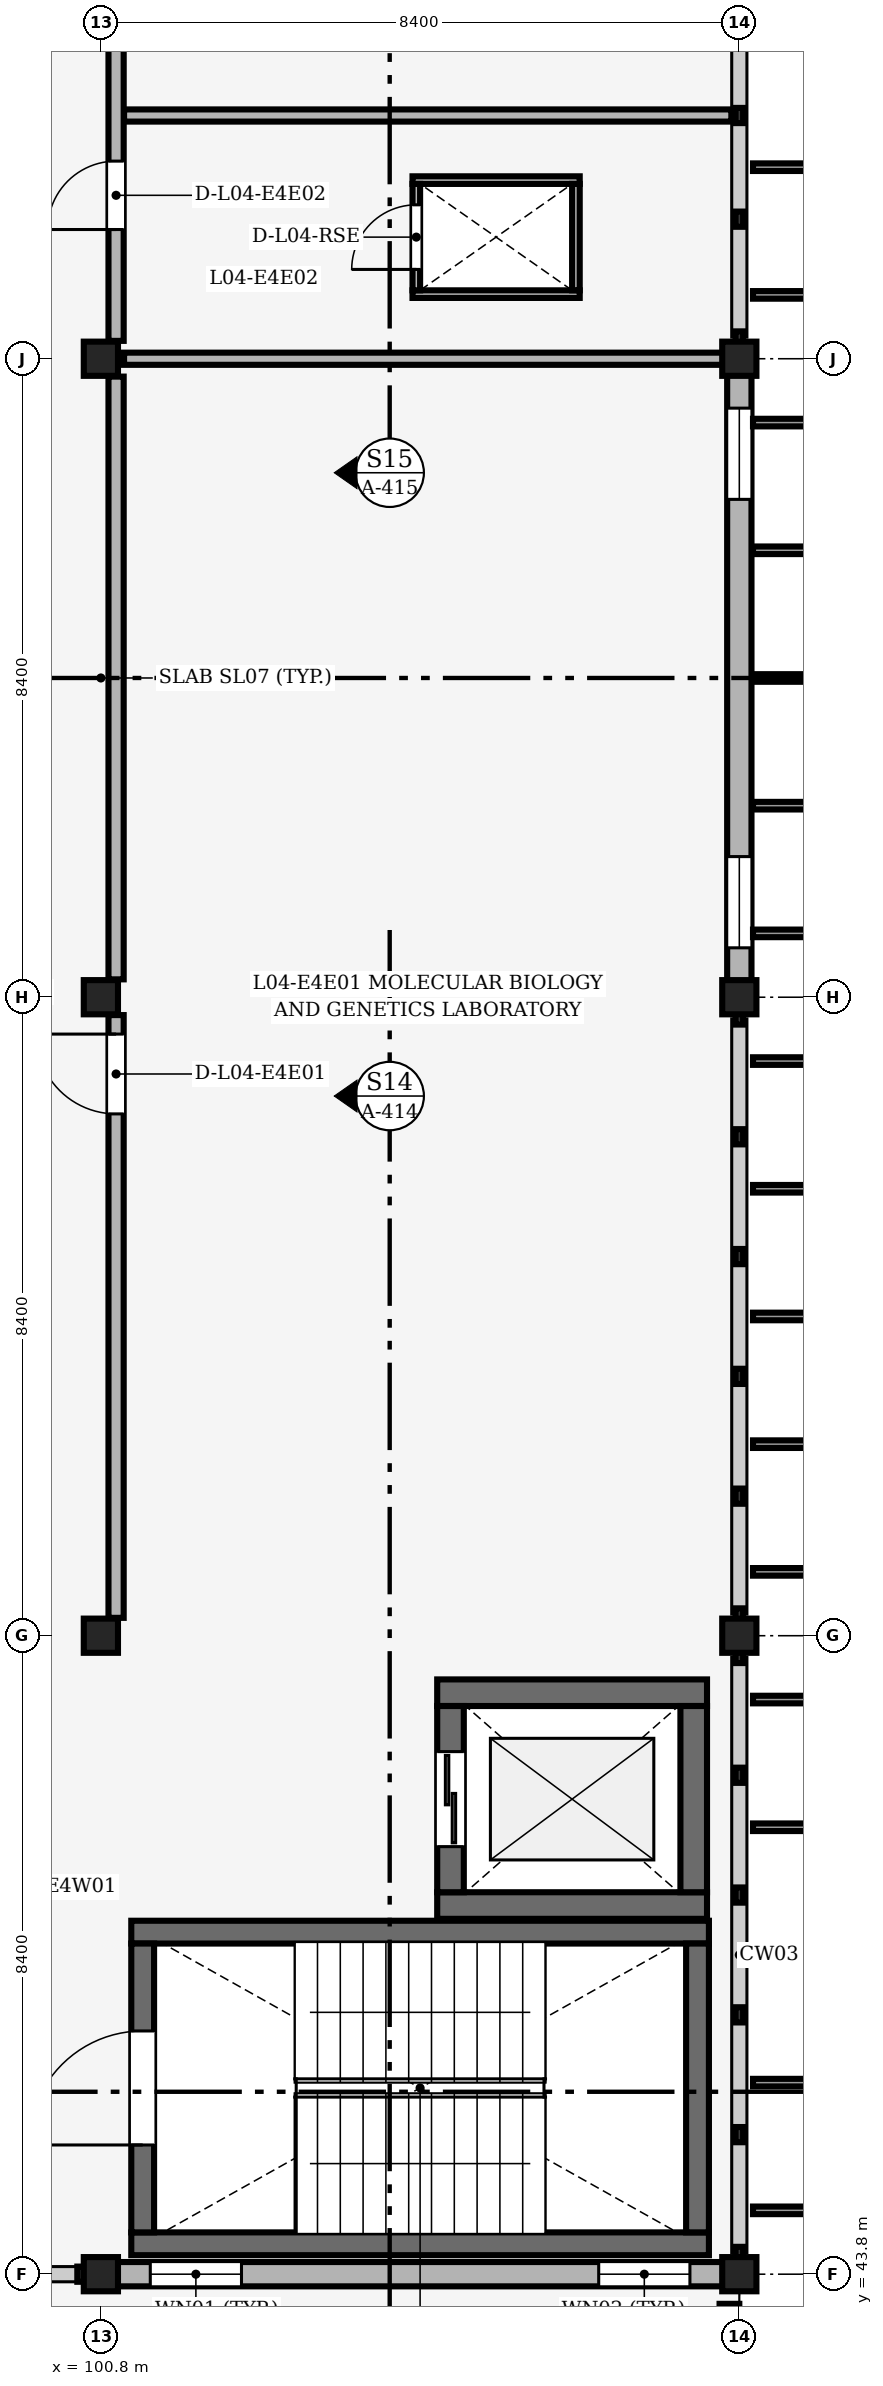
"""IFC4 building model, lengths in metres.
Left out: names, types, materials, properties, quantities, classifications, styles, units other than length and angle.
Written with IfcOpenShell. Run it as: python <this file> out.ifc"""

import sys

from ifc_helpers import new_model, si_unit, direction, frame, frame_2d, origin, origin_2d, place, context, subcontext, project, spatial, rectangle, extrude, element, fill, save


model = new_model("IFC4")
c1 = context("Model", 3, precision=1e-05, world=origin(), true_north=direction((0.0, 1.0)))
c2 = subcontext(c1, "Body", "Model", "MODEL_VIEW")
j1 = project(units=[si_unit("LENGTHUNIT", "METRE"), si_unit("PLANEANGLEUNIT", "RADIAN")], contexts=[c1])
p1 = place(None, origin())
s1 = spatial("IfcSite", under=j1, at=p1, CompositionType="ELEMENT")
p2 = place(p1, origin())
s2 = spatial("IfcBuilding", under=s1, at=p2, CompositionType="ELEMENT")
p3 = place(p2, frame((0.0, 0.0, 17.4)))
s3 = spatial("IfcBuildingStorey", under=s2, at=p3, CompositionType="ELEMENT", Elevation=17.4)
for number, where, z_axis, x_axis in (
    (1, (100.8, 43.8, 0.0), (0.0, 0.0, 1.0), (1.0, 0.0, 0.0)),
    (2, (100.8, 52.2, 0.0), (0.0, 0.0, 1.0), (1.0, 0.0, 0.0)),
    (3, (100.8, 60.6, 0.0), (0.0, 0.0, 1.0), (1.0, 0.0, 0.0)),
    (4, (100.8, 69.0, 0.0), (0.0, 0.0, 1.0), (1.0, 0.0, 0.0)),
    (5, (109.2, 43.8, 0.0), (0.0, 0.0, 1.0), (1.0, 0.0, 0.0)),
    (6, (109.2, 52.2, 0.0), (0.0, 0.0, 1.0), (1.0, 0.0, 0.0)),
    (7, (109.2, 60.6, 0.0), (0.0, 0.0, 1.0), (1.0, 0.0, 0.0)),
    (8, (109.2, 69.0, 0.0), (0.0, 0.0, 1.0), (1.0, 0.0, 0.0)),
):
    element("IfcColumn", number, at=place(p3, frame(where, z_axis=z_axis, x_axis=x_axis)), inside=s3, PredefinedType="COLUMN", context=c2, shape_type="SweptSolid", body=[
        extrude(rectangle(XDim=0.45, YDim=0.45, at=origin_2d()), origin(), (0.0, 0.0, 1.0), 4.2),
    ])
p4 = place(p3, frame((101.0, 43.8, 0.0), z_axis=(0.0, 0.0, 1.0), x_axis=(1.0, 0.0, 0.0)))
e9 = element("IfcWall", 9, at=p4, inside=s3, PredefinedType="SOLIDWALL", context=c2, shape_type="SweptSolid", body=[
    extrude(rectangle(XDim=8.0, YDim=0.32, at=frame_2d((4.0, 0.0))), origin(), (0.0, 0.0, 1.0), 3.19),
])
p5 = place(p4, frame((0.45, 0.0, 0.9)))
e10 = element("IfcOpeningElement", 10, at=p5, cuts=e9, PredefinedType="OPENING", context=c2, shape_type="SweptSolid", body=[
    extrude(rectangle(XDim=1.2, YDim=1.5, at=frame_2d((0.6, 0.75))), frame((0.0, 0.17, 0.0), z_axis=(0.0, -1.0, 0.0), x_axis=(1.0, 0.0, 0.0)), (0.0, 0.0, 1.0), 0.34),
])
p6 = place(p4, frame((6.35, 0.0, 0.9)))
e11 = element("IfcOpeningElement", 11, at=p6, cuts=e9, PredefinedType="OPENING", context=c2, shape_type="SweptSolid", body=[
    extrude(rectangle(XDim=1.2, YDim=1.8, at=frame_2d((0.6, 0.9))), frame((0.0, 0.17, 0.0), z_axis=(0.0, -1.0, 0.0), x_axis=(1.0, 0.0, 0.0)), (0.0, 0.0, 1.0), 0.34),
])
p7 = place(p3, frame((109.2, 60.8, 0.0), z_axis=(0.0, 0.0, 1.0), x_axis=(0.0, 1.0, 0.0)))
e12 = element("IfcWall", 12, at=p7, inside=s3, PredefinedType="SOLIDWALL", context=c2, shape_type="SweptSolid", body=[
    extrude(rectangle(XDim=8.0, YDim=0.32, at=frame_2d((4.0, 0.0))), origin(), (0.0, 0.0, 1.0), 3.48),
])
p8 = place(p7, frame((0.45, 0.0, 0.85)))
e13 = element("IfcOpeningElement", 13, at=p8, cuts=e12, PredefinedType="OPENING", context=c2, shape_type="SweptSolid", body=[
    extrude(rectangle(XDim=1.2, YDim=1.8, at=frame_2d((0.6, 0.9))), frame((0.0, 0.17, 0.0), z_axis=(0.0, -1.0, 0.0), x_axis=(1.0, 0.0, 0.0)), (0.0, 0.0, 1.0), 0.34),
])
p9 = place(p7, frame((6.35, 0.0, 0.85)))
e14 = element("IfcOpeningElement", 14, at=p9, cuts=e12, PredefinedType="OPENING", context=c2, shape_type="SweptSolid", body=[
    extrude(rectangle(XDim=1.2, YDim=1.8, at=frame_2d((0.6, 0.9))), frame((0.0, 0.17, 0.0), z_axis=(0.0, -1.0, 0.0), x_axis=(1.0, 0.0, 0.0)), (0.0, 0.0, 1.0), 0.34),
])
p10 = place(p3, frame((109.07, 35.79, 0.0), z_axis=(0.0, 0.0, 1.0), x_axis=(0.0, 1.0, 0.0)))
e15 = element("IfcWall", 15, at=p10, inside=s3, PredefinedType="PARAPET", context=c2, shape_type="SweptSolid", body=[
    extrude(rectangle(XDim=7.62, YDim=0.26, at=frame_2d((3.81, 0.0))), origin(), (0.0, 0.0, 1.0), 0.85),
])
for number, where, z_axis, x_axis in (
    (16, (101.2, 44.2, 0.0), (0.0, 0.0, 1.0), (1.0, 0.0, 0.0)),
    (17, (101.2, 48.3, 0.0), (0.0, 0.0, 1.0), (1.0, 0.0, 0.0)),
):
    element("IfcWall", number, at=place(p3, frame(where, z_axis=z_axis, x_axis=x_axis)), inside=s3, PredefinedType="SHEAR", context=c2, shape_type="SweptSolid", body=[
        extrude(rectangle(XDim=7.6, YDim=0.3, at=frame_2d((3.8, 0.0))), origin(), (0.0, 0.0, 1.0), 4.025),
    ])
p11 = place(p3, frame((101.35, 44.35, 0.0), z_axis=(0.0, 0.0, 1.0), x_axis=(0.0, 1.0, 0.0)))
e18 = element("IfcWall", 18, at=p11, inside=s3, PredefinedType="SHEAR", context=c2, shape_type="SweptSolid", body=[
    extrude(rectangle(XDim=3.8, YDim=0.3, at=frame_2d((1.9, 0.0))), origin(), (0.0, 0.0, 1.0), 4.025),
])
p12 = place(p11, frame((1.15, 0.0, 0.0)))
e19 = element("IfcOpeningElement", 19, at=p12, cuts=e18, PredefinedType="OPENING", context=c2, shape_type="SweptSolid", body=[
    extrude(rectangle(XDim=1.5, YDim=2.2, at=frame_2d((0.75, 1.1))), frame((0.0, 0.16, 0.0), z_axis=(0.0, -1.0, 0.0), x_axis=(1.0, 0.0, 0.0)), (0.0, 0.0, 1.0), 0.32),
])
p13 = place(p3, frame((108.65, 44.35, 0.0), z_axis=(0.0, 0.0, 1.0), x_axis=(0.0, 1.0, 0.0)))
e20 = element("IfcWall", 20, at=p13, inside=s3, PredefinedType="SHEAR", context=c2, shape_type="SweptSolid", body=[
    extrude(rectangle(XDim=3.8, YDim=0.3, at=frame_2d((1.9, 0.0))), origin(), (0.0, 0.0, 1.0), 4.025),
])
for number, where, z_axis, x_axis in (
    (21, (105.225, 48.65, 0.0), (0.0, 0.0, 1.0), (1.0, 0.0, 0.0)),
    (22, (105.225, 51.45, 0.0), (0.0, 0.0, 1.0), (1.0, 0.0, 0.0)),
):
    element("IfcWall", number, at=place(p3, frame(where, z_axis=z_axis, x_axis=x_axis)), inside=s3, PredefinedType="SHEAR", context=c2, shape_type="SweptSolid", body=[
        extrude(rectangle(XDim=3.55, YDim=0.35, at=frame_2d((1.775, 0.0))), origin(), (0.0, 0.0, 1.0), 3.92),
    ])
p14 = place(p3, frame((105.4, 48.825, 0.0), z_axis=(0.0, 0.0, 1.0), x_axis=(0.0, 1.0, 0.0)))
e23 = element("IfcWall", 23, at=p14, inside=s3, PredefinedType="SHEAR", context=c2, shape_type="SweptSolid", body=[
    extrude(rectangle(XDim=2.45, YDim=0.35, at=frame_2d((1.225, 0.0))), origin(), (0.0, 0.0, 1.0), 3.92),
])
p15 = place(p14, frame((0.6, 0.0, 0.0)))
e24 = element("IfcOpeningElement", 24, at=p15, cuts=e23, PredefinedType="OPENING", context=c2, shape_type="SweptSolid", body=[
    extrude(rectangle(XDim=1.25, YDim=2.25, at=frame_2d((0.625, 1.125))), frame((0.0, 0.185, 0.0), z_axis=(0.0, -1.0, 0.0), x_axis=(1.0, 0.0, 0.0)), (0.0, 0.0, 1.0), 0.37),
])
p16 = place(p3, frame((108.6, 48.825, 0.0), z_axis=(0.0, 0.0, 1.0), x_axis=(0.0, 1.0, 0.0)))
e25 = element("IfcWall", 25, at=p16, inside=s3, PredefinedType="SHEAR", context=c2, shape_type="SweptSolid", body=[
    extrude(rectangle(XDim=2.45, YDim=0.35, at=frame_2d((1.225, 0.0))), origin(), (0.0, 0.0, 1.0), 3.92),
])
for number, where, z_axis, x_axis in (
    (26, (104.9, 69.85, 0.0), (0.0, 0.0, 1.0), (1.0, 0.0, 0.0)),
    (27, (104.9, 71.35, 0.0), (0.0, 0.0, 1.0), (1.0, 0.0, 0.0)),
):
    element("IfcWall", number, at=place(p3, frame(where, z_axis=z_axis, x_axis=x_axis)), inside=s3, PredefinedType="PARTITIONING", context=c2, shape_type="SweptSolid", body=[
        extrude(rectangle(XDim=2.2, YDim=0.1, at=frame_2d((1.1, 0.0))), origin(), (0.0, 0.0, 1.0), 3.9),
    ])
p17 = place(p3, frame((104.95, 69.9, 0.0), z_axis=(0.0, 0.0, 1.0), x_axis=(0.0, 1.0, 0.0)))
e28 = element("IfcWall", 28, at=p17, inside=s3, PredefinedType="PARTITIONING", context=c2, shape_type="SweptSolid", body=[
    extrude(rectangle(XDim=1.4, YDim=0.1, at=frame_2d((0.7, 0.0))), origin(), (0.0, 0.0, 1.0), 3.9),
])
p18 = place(p17, frame((0.275, 0.0, 0.0)))
e29 = element("IfcOpeningElement", 29, at=p18, cuts=e28, PredefinedType="OPENING", context=c2, shape_type="SweptSolid", body=[
    extrude(rectangle(XDim=0.85, YDim=2.05, at=frame_2d((0.425, 1.025))), frame((0.0, 0.06, 0.0), z_axis=(0.0, -1.0, 0.0), x_axis=(1.0, 0.0, 0.0)), (0.0, 0.0, 1.0), 0.12),
])
p19 = place(p3, frame((107.05, 69.9, 0.0), z_axis=(0.0, 0.0, 1.0), x_axis=(0.0, 1.0, 0.0)))
e30 = element("IfcWall", 30, at=p19, inside=s3, PredefinedType="PARTITIONING", context=c2, shape_type="SweptSolid", body=[
    extrude(rectangle(XDim=1.4, YDim=0.1, at=frame_2d((0.7, 0.0))), origin(), (0.0, 0.0, 1.0), 3.9),
])
p20 = place(p3, frame((101.105, 69.0, 0.0), z_axis=(0.0, 0.0, 1.0), x_axis=(1.0, 0.0, 0.0)))
e31 = element("IfcWall", 31, at=p20, inside=s3, PredefinedType="PARTITIONING", context=c2, shape_type="SweptSolid", body=[
    extrude(rectangle(XDim=7.93, YDim=0.16, at=frame_2d((3.965, 0.0))), origin(), (0.0, 0.0, 1.0), 3.43),
])
p21 = place(p3, frame((101.105, 72.2, 0.0), z_axis=(0.0, 0.0, 1.0), x_axis=(1.0, 0.0, 0.0)))
e32 = element("IfcWall", 32, at=p21, inside=s3, PredefinedType="PARTITIONING", context=c2, shape_type="SweptSolid", body=[
    extrude(rectangle(XDim=7.99, YDim=0.16, at=frame_2d((3.995, 0.0))), origin(), (0.0, 0.0, 1.0), 3.9),
])
p22 = place(p3, frame((101.0, 52.435, 0.0), z_axis=(0.0, 0.0, 1.0), x_axis=(0.0, 1.0, 0.0)))
e33 = element("IfcWall", 33, at=p22, inside=s3, PredefinedType="PARTITIONING", context=c2, shape_type="SweptSolid", body=[
    extrude(rectangle(XDim=7.93, YDim=0.2, at=frame_2d((3.965, 0.0))), origin(), (0.0, 0.0, 1.0), 3.13),
])
p23 = place(p22, frame((6.63, 0.0, 0.0)))
e34 = element("IfcOpeningElement", 34, at=p23, cuts=e33, PredefinedType="OPENING", context=c2, shape_type="SweptSolid", body=[
    extrude(rectangle(XDim=1.05, YDim=2.2, at=frame_2d((0.525, 1.1))), frame((0.0, 0.11, 0.0), z_axis=(0.0, -1.0, 0.0), x_axis=(1.0, 0.0, 0.0)), (0.0, 0.0, 1.0), 0.22),
])
p24 = place(p3, frame((101.0, 60.835, 0.0), z_axis=(0.0, 0.0, 1.0), x_axis=(0.0, 1.0, 0.0)))
e35 = element("IfcWall", 35, at=p24, inside=s3, PredefinedType="PARTITIONING", context=c2, shape_type="SweptSolid", body=[
    extrude(rectangle(XDim=7.93, YDim=0.2, at=frame_2d((3.965, 0.0))), origin(), (0.0, 0.0, 1.0), 3.43),
])
p25 = place(p3, frame((101.0, 69.235, 0.0), z_axis=(0.0, 0.0, 1.0), x_axis=(0.0, 1.0, 0.0)))
e36 = element("IfcWall", 36, at=p25, inside=s3, PredefinedType="PARTITIONING", context=c2, shape_type="SweptSolid", body=[
    extrude(rectangle(XDim=7.93, YDim=0.2, at=frame_2d((3.965, 0.0))), origin(), (0.0, 0.0, 1.0), 3.48),
])
p26 = place(p25, frame((1.465, 0.0, 0.0)))
e37 = element("IfcOpeningElement", 37, at=p26, cuts=e36, PredefinedType="OPENING", context=c2, shape_type="SweptSolid", body=[
    extrude(rectangle(XDim=0.9, YDim=2.1, at=frame_2d((0.45, 1.05))), frame((0.0, 0.11, 0.0), z_axis=(0.0, -1.0, 0.0), x_axis=(1.0, 0.0, 0.0)), (0.0, 0.0, 1.0), 0.22),
])
p27 = place(p25, frame((5.04, 0.0, 0.0)))
e38 = element("IfcOpeningElement", 38, at=p27, cuts=e36, PredefinedType="OPENING", context=c2, shape_type="SweptSolid", body=[
    extrude(rectangle(XDim=1.05, YDim=2.2, at=frame_2d((0.525, 1.1))), frame((0.0, 0.11, 0.0), z_axis=(0.0, -1.0, 0.0), x_axis=(1.0, 0.0, 0.0)), (0.0, 0.0, 1.0), 0.22),
])
p28 = place(p5, origin())
e39 = element("IfcWindow", 39, at=p28, inside=s3, PartitioningType="SINGLE_PANEL", PredefinedType="WINDOW", context=c2, shape_type="SweptSolid", body=[
    extrude(rectangle(XDim=1.2, YDim=1.5, at=frame_2d((0.6, 0.75))), frame((0.0, 0.03, 0.0), z_axis=(0.0, -1.0, 0.0), x_axis=(1.0, 0.0, 0.0)), (0.0, 0.0, 1.0), 0.06),
])
fill(e10, e39)
p29 = place(p6, origin())
e40 = element("IfcWindow", 40, at=p29, inside=s3, PartitioningType="SINGLE_PANEL", PredefinedType="WINDOW", context=c2, shape_type="SweptSolid", body=[
    extrude(rectangle(XDim=1.2, YDim=1.8, at=frame_2d((0.6, 0.9))), frame((0.0, 0.03, 0.0), z_axis=(0.0, -1.0, 0.0), x_axis=(1.0, 0.0, 0.0)), (0.0, 0.0, 1.0), 0.06),
])
fill(e11, e40)
p30 = place(p8, origin())
e41 = element("IfcWindow", 41, at=p30, inside=s3, PartitioningType="SINGLE_PANEL", PredefinedType="WINDOW", context=c2, shape_type="SweptSolid", body=[
    extrude(rectangle(XDim=1.2, YDim=1.8, at=frame_2d((0.6, 0.9))), frame((0.0, 0.03, 0.0), z_axis=(0.0, -1.0, 0.0), x_axis=(1.0, 0.0, 0.0)), (0.0, 0.0, 1.0), 0.06),
])
fill(e13, e41)
p31 = place(p9, origin())
e42 = element("IfcWindow", 42, at=p31, inside=s3, PartitioningType="SINGLE_PANEL", PredefinedType="WINDOW", context=c2, shape_type="SweptSolid", body=[
    extrude(rectangle(XDim=1.2, YDim=1.8, at=frame_2d((0.6, 0.9))), frame((0.0, 0.03, 0.0), z_axis=(0.0, -1.0, 0.0), x_axis=(1.0, 0.0, 0.0)), (0.0, 0.0, 1.0), 0.06),
])
fill(e14, e42)
p32 = place(p12, origin())
e43 = element("IfcDoor", 43, at=p32, inside=s3, OperationType="DOUBLE_DOOR_SINGLE_SWING", PredefinedType="DOOR", context=c2, shape_type="SweptSolid", body=[
    extrude(rectangle(XDim=1.5, YDim=2.2, at=frame_2d((0.75, 1.1))), frame((0.0, 0.025, 0.0), z_axis=(0.0, -1.0, 0.0), x_axis=(1.0, 0.0, 0.0)), (0.0, 0.0, 1.0), 0.05),
])
fill(e19, e43)
p33 = place(p15, origin())
e44 = element("IfcDoor", 44, at=p33, inside=s3, OperationType="DOUBLE_DOOR_SLIDING", PredefinedType="DOOR", context=c2, shape_type="SweptSolid", body=[
    extrude(rectangle(XDim=1.25, YDim=2.25, at=frame_2d((0.625, 1.125))), frame((0.0, 0.025, 0.0), z_axis=(0.0, -1.0, 0.0), x_axis=(1.0, 0.0, 0.0)), (0.0, 0.0, 1.0), 0.05),
])
fill(e24, e44)
p34 = place(p18, origin())
e45 = element("IfcDoor", 45, at=p34, inside=s3, OperationType="SINGLE_SWING_LEFT", PredefinedType="DOOR", context=c2, shape_type="SweptSolid", body=[
    extrude(rectangle(XDim=0.85, YDim=2.05, at=frame_2d((0.425, 1.025))), frame((0.0, 0.025, 0.0), z_axis=(0.0, -1.0, 0.0), x_axis=(1.0, 0.0, 0.0)), (0.0, 0.0, 1.0), 0.05),
])
fill(e29, e45)
p35 = place(p23, origin())
e46 = element("IfcDoor", 46, at=p35, inside=s3, OperationType="SINGLE_SWING_RIGHT", PredefinedType="DOOR", context=c2, shape_type="SweptSolid", body=[
    extrude(rectangle(XDim=1.05, YDim=2.2, at=frame_2d((0.525, 1.1))), frame((0.0, 0.025, 0.0), z_axis=(0.0, -1.0, 0.0), x_axis=(1.0, 0.0, 0.0)), (0.0, 0.0, 1.0), 0.05),
])
fill(e34, e46)
p36 = place(p26, origin())
e47 = element("IfcDoor", 47, at=p36, inside=s3, OperationType="SINGLE_SWING_LEFT", PredefinedType="DOOR", context=c2, shape_type="SweptSolid", body=[
    extrude(rectangle(XDim=0.9, YDim=2.1, at=frame_2d((0.45, 1.05))), frame((0.0, 0.025, 0.0), z_axis=(0.0, -1.0, 0.0), x_axis=(1.0, 0.0, 0.0)), (0.0, 0.0, 1.0), 0.05),
])
fill(e37, e47)
save(model, sys.argv[1])
